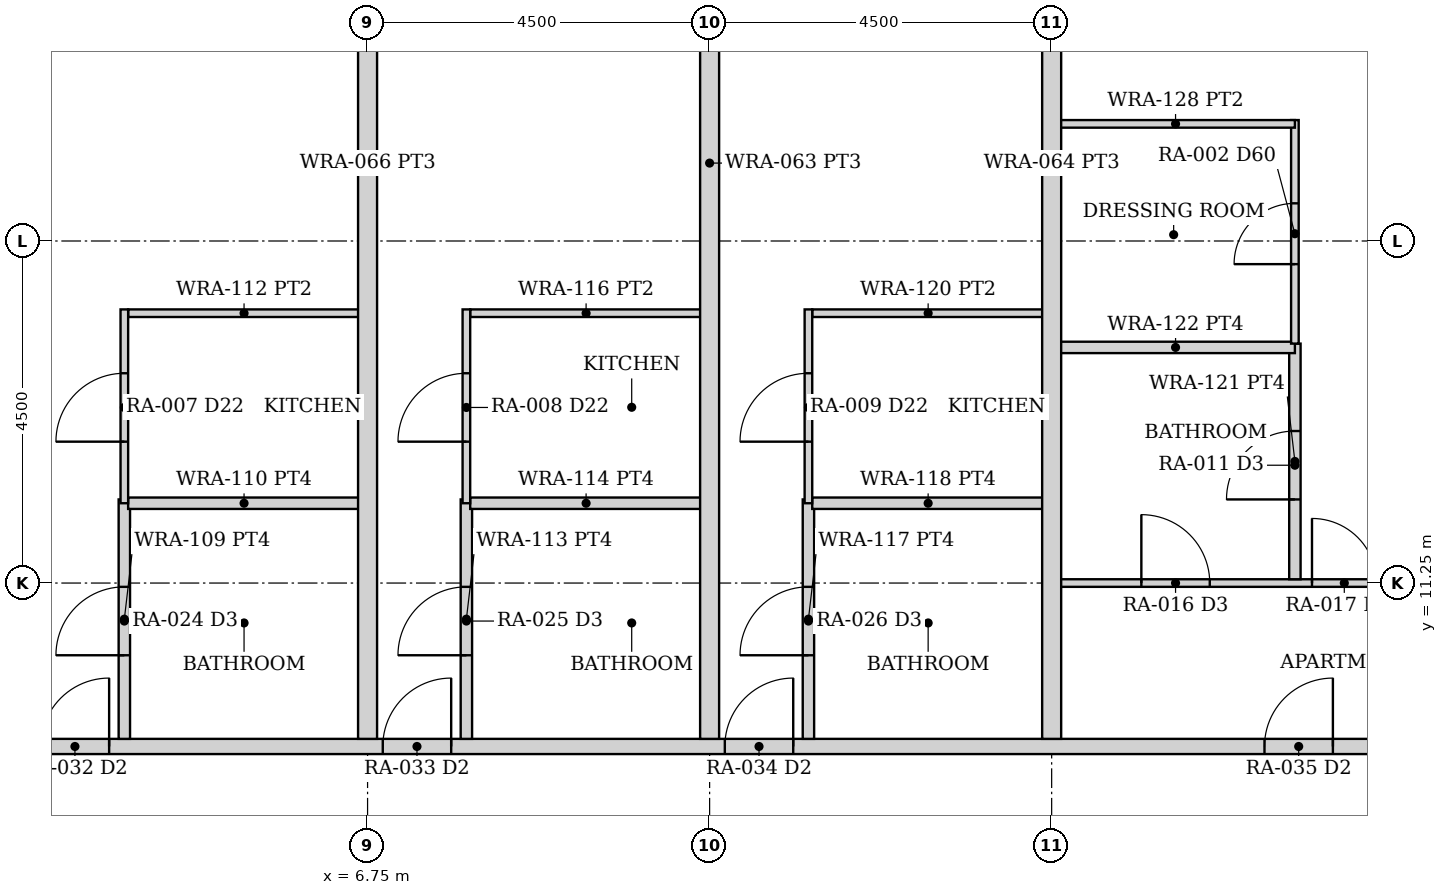
"""IFC4 building model, lengths in metres.
Left out: names, types, materials, properties, quantities, classifications, styles, units other than length and angle.
Written with IfcOpenShell. Run it as: python <this file> out.ifc"""

import sys

from ifc_helpers import new_model, si_unit, direction, frame, frame_2d, origin, place, context, subcontext, project, spatial, rectangle, extrude, element, fill, save


model = new_model("IFC4")
c1 = context("Model", 3, precision=1e-05, world=origin(), true_north=direction((0.0, 1.0)))
c2 = subcontext(c1, "Body", "Model", "MODEL_VIEW")
j1 = project(units=[si_unit("LENGTHUNIT", "METRE"), si_unit("PLANEANGLEUNIT", "RADIAN")], contexts=[c1])
p1 = place(None, origin())
s1 = spatial("IfcSite", under=j1, at=p1, CompositionType="ELEMENT")
p2 = place(p1, origin())
s2 = spatial("IfcBuilding", under=s1, at=p2, CompositionType="ELEMENT")
p3 = place(p2, frame((0.0, 0.0, 30.0)))
s3 = spatial("IfcBuildingStorey", under=s2, at=p3, CompositionType="ELEMENT", Elevation=30.0)
p4 = place(p3, frame((-24.55, 9.1, 0.0), z_axis=(0.0, 0.0, 1.0), x_axis=(1.0, 0.0, 0.0)))
e1 = element("IfcWall", 1, at=p4, inside=s3, PredefinedType="PARTITIONING", context=c2, shape_type="SweptSolid", body=[
    extrude(rectangle(XDim=49.1, YDim=0.2, at=frame_2d((24.55, 0.0))), origin(), (0.0, 0.0, 1.0), 2.373),
])
p5 = place(p4, frame((5.1, 0.0, 0.0)))
e2 = element("IfcOpeningElement", 2, at=p5, cuts=e1, PredefinedType="OPENING", context=c2, shape_type="SweptSolid", body=[
    extrude(rectangle(XDim=0.9, YDim=2.1, at=frame_2d((0.45, 1.05))), frame((0.0, 0.11, 0.0), z_axis=(0.0, -1.0, 0.0), x_axis=(1.0, 0.0, 0.0)), (0.0, 0.0, 1.0), 0.22),
])
p6 = place(p4, frame((9.0, 0.0, 0.0)))
e3 = element("IfcOpeningElement", 3, at=p6, cuts=e1, PredefinedType="OPENING", context=c2, shape_type="SweptSolid", body=[
    extrude(rectangle(XDim=0.9, YDim=2.1, at=frame_2d((0.45, 1.05))), frame((0.0, 0.11, 0.0), z_axis=(0.0, -1.0, 0.0), x_axis=(1.0, 0.0, 0.0)), (0.0, 0.0, 1.0), 0.22),
])
p7 = place(p4, frame((13.5, 0.0, 0.0)))
e4 = element("IfcOpeningElement", 4, at=p7, cuts=e1, PredefinedType="OPENING", context=c2, shape_type="SweptSolid", body=[
    extrude(rectangle(XDim=0.9, YDim=2.1, at=frame_2d((0.45, 1.05))), frame((0.0, 0.11, 0.0), z_axis=(0.0, -1.0, 0.0), x_axis=(1.0, 0.0, 0.0)), (0.0, 0.0, 1.0), 0.22),
])
p8 = place(p4, frame((18.0, 0.0, 0.0)))
e5 = element("IfcOpeningElement", 5, at=p8, cuts=e1, PredefinedType="OPENING", context=c2, shape_type="SweptSolid", body=[
    extrude(rectangle(XDim=0.9, YDim=2.1, at=frame_2d((0.45, 1.05))), frame((0.0, 0.11, 0.0), z_axis=(0.0, -1.0, 0.0), x_axis=(1.0, 0.0, 0.0)), (0.0, 0.0, 1.0), 0.22),
])
p9 = place(p4, frame((22.5, 0.0, 0.0)))
e6 = element("IfcOpeningElement", 6, at=p9, cuts=e1, PredefinedType="OPENING", context=c2, shape_type="SweptSolid", body=[
    extrude(rectangle(XDim=0.9, YDim=2.1, at=frame_2d((0.45, 1.05))), frame((0.0, 0.11, 0.0), z_axis=(0.0, -1.0, 0.0), x_axis=(1.0, 0.0, 0.0)), (0.0, 0.0, 1.0), 0.22),
])
p10 = place(p4, frame((27.0, 0.0, 0.0)))
e7 = element("IfcOpeningElement", 7, at=p10, cuts=e1, PredefinedType="OPENING", context=c2, shape_type="SweptSolid", body=[
    extrude(rectangle(XDim=0.9, YDim=2.1, at=frame_2d((0.45, 1.05))), frame((0.0, 0.11, 0.0), z_axis=(0.0, -1.0, 0.0), x_axis=(1.0, 0.0, 0.0)), (0.0, 0.0, 1.0), 0.22),
])
p11 = place(p4, frame((31.5, 0.0, 0.0)))
e8 = element("IfcOpeningElement", 8, at=p11, cuts=e1, PredefinedType="OPENING", context=c2, shape_type="SweptSolid", body=[
    extrude(rectangle(XDim=0.9, YDim=2.1, at=frame_2d((0.45, 1.05))), frame((0.0, 0.11, 0.0), z_axis=(0.0, -1.0, 0.0), x_axis=(1.0, 0.0, 0.0)), (0.0, 0.0, 1.0), 0.22),
])
p12 = place(p4, frame((36.0, 0.0, 0.0)))
e9 = element("IfcOpeningElement", 9, at=p12, cuts=e1, PredefinedType="OPENING", context=c2, shape_type="SweptSolid", body=[
    extrude(rectangle(XDim=0.9, YDim=2.1, at=frame_2d((0.45, 1.05))), frame((0.0, 0.11, 0.0), z_axis=(0.0, -1.0, 0.0), x_axis=(1.0, 0.0, 0.0)), (0.0, 0.0, 1.0), 0.22),
])
p13 = place(p4, frame((43.1, 0.0, 0.0)))
e10 = element("IfcOpeningElement", 10, at=p13, cuts=e1, PredefinedType="OPENING", context=c2, shape_type="SweptSolid", body=[
    extrude(rectangle(XDim=0.9, YDim=2.1, at=frame_2d((0.45, 1.05))), frame((0.0, 0.11, 0.0), z_axis=(0.0, -1.0, 0.0), x_axis=(1.0, 0.0, 0.0)), (0.0, 0.0, 1.0), 0.22),
])
p14 = place(p3, frame((3.55, 9.2, 0.0), z_axis=(0.0, 0.0, 1.0), x_axis=(0.0, 1.0, 0.0)))
e11 = element("IfcWall", 11, at=p14, inside=s3, PredefinedType="PARTITIONING", context=c2, shape_type="SweptSolid", body=[
    extrude(rectangle(XDim=3.15, YDim=0.15, at=frame_2d((1.575, 0.0))), origin(), (0.0, 0.0, 1.0), 2.373),
])
p15 = place(p14, frame((1.1, 0.0, 0.0)))
e12 = element("IfcOpeningElement", 12, at=p15, cuts=e11, PredefinedType="OPENING", context=c2, shape_type="SweptSolid", body=[
    extrude(rectangle(XDim=0.9, YDim=2.1, at=frame_2d((0.45, 1.05))), frame((0.0, 0.085, 0.0), z_axis=(0.0, -1.0, 0.0), x_axis=(1.0, 0.0, 0.0)), (0.0, 0.0, 1.0), 0.17),
])
p16 = place(p3, frame((3.6, 12.3, 0.0), z_axis=(0.0, 0.0, 1.0), x_axis=(1.0, 0.0, 0.0)))
e13 = element("IfcWall", 13, at=p16, inside=s3, PredefinedType="PARTITIONING", context=c2, shape_type="SweptSolid", body=[
    extrude(rectangle(XDim=3.05, YDim=0.15, at=frame_2d((1.525, 0.0))), origin(), (0.0, 0.0, 1.0), 2.373),
])
p17 = place(p3, frame((3.6, 14.8, 0.0), z_axis=(0.0, 0.0, 1.0), x_axis=(1.0, 0.0, 0.0)))
e14 = element("IfcWall", 14, at=p17, inside=s3, PredefinedType="PARTITIONING", context=c2, shape_type="SweptSolid", body=[
    extrude(rectangle(XDim=3.05, YDim=0.1, at=frame_2d((1.525, 0.0))), origin(), (0.0, 0.0, 1.0), 2.373),
])
p18 = place(p3, frame((3.55, 12.3, 0.0), z_axis=(0.0, 0.0, 1.0), x_axis=(0.0, 1.0, 0.0)))
e15 = element("IfcWall", 15, at=p18, inside=s3, PredefinedType="PARTITIONING", context=c2, shape_type="SweptSolid", body=[
    extrude(rectangle(XDim=2.55, YDim=0.1, at=frame_2d((1.275, 0.0))), origin(), (0.0, 0.0, 1.0), 2.373),
])
p19 = place(p18, frame((0.81, 0.0, 0.0)))
e16 = element("IfcOpeningElement", 16, at=p19, cuts=e15, PredefinedType="OPENING", context=c2, shape_type="SweptSolid", body=[
    extrude(rectangle(XDim=0.9, YDim=2.1, at=frame_2d((0.45, 1.05))), frame((0.0, 0.06, 0.0), z_axis=(0.0, -1.0, 0.0), x_axis=(1.0, 0.0, 0.0)), (0.0, 0.0, 1.0), 0.12),
])
p20 = place(p3, frame((8.05, 9.2, 0.0), z_axis=(0.0, 0.0, 1.0), x_axis=(0.0, 1.0, 0.0)))
e17 = element("IfcWall", 17, at=p20, inside=s3, PredefinedType="PARTITIONING", context=c2, shape_type="SweptSolid", body=[
    extrude(rectangle(XDim=3.15, YDim=0.15, at=frame_2d((1.575, 0.0))), origin(), (0.0, 0.0, 1.0), 2.373),
])
p21 = place(p20, frame((1.1, 0.0, 0.0)))
e18 = element("IfcOpeningElement", 18, at=p21, cuts=e17, PredefinedType="OPENING", context=c2, shape_type="SweptSolid", body=[
    extrude(rectangle(XDim=0.9, YDim=2.1, at=frame_2d((0.45, 1.05))), frame((0.0, 0.085, 0.0), z_axis=(0.0, -1.0, 0.0), x_axis=(1.0, 0.0, 0.0)), (0.0, 0.0, 1.0), 0.17),
])
p22 = place(p3, frame((8.1, 12.3, 0.0), z_axis=(0.0, 0.0, 1.0), x_axis=(1.0, 0.0, 0.0)))
e19 = element("IfcWall", 19, at=p22, inside=s3, PredefinedType="PARTITIONING", context=c2, shape_type="SweptSolid", body=[
    extrude(rectangle(XDim=3.05, YDim=0.15, at=frame_2d((1.525, 0.0))), origin(), (0.0, 0.0, 1.0), 2.373),
])
p23 = place(p3, frame((8.1, 14.8, 0.0), z_axis=(0.0, 0.0, 1.0), x_axis=(1.0, 0.0, 0.0)))
e20 = element("IfcWall", 20, at=p23, inside=s3, PredefinedType="PARTITIONING", context=c2, shape_type="SweptSolid", body=[
    extrude(rectangle(XDim=3.05, YDim=0.1, at=frame_2d((1.525, 0.0))), origin(), (0.0, 0.0, 1.0), 2.373),
])
p24 = place(p3, frame((8.05, 12.3, 0.0), z_axis=(0.0, 0.0, 1.0), x_axis=(0.0, 1.0, 0.0)))
e21 = element("IfcWall", 21, at=p24, inside=s3, PredefinedType="PARTITIONING", context=c2, shape_type="SweptSolid", body=[
    extrude(rectangle(XDim=2.55, YDim=0.1, at=frame_2d((1.275, 0.0))), origin(), (0.0, 0.0, 1.0), 2.373),
])
p25 = place(p24, frame((0.81, 0.0, 0.0)))
e22 = element("IfcOpeningElement", 22, at=p25, cuts=e21, PredefinedType="OPENING", context=c2, shape_type="SweptSolid", body=[
    extrude(rectangle(XDim=0.9, YDim=2.1, at=frame_2d((0.45, 1.05))), frame((0.0, 0.06, 0.0), z_axis=(0.0, -1.0, 0.0), x_axis=(1.0, 0.0, 0.0)), (0.0, 0.0, 1.0), 0.12),
])
p26 = place(p3, frame((12.55, 9.2, 0.0), z_axis=(0.0, 0.0, 1.0), x_axis=(0.0, 1.0, 0.0)))
e23 = element("IfcWall", 23, at=p26, inside=s3, PredefinedType="PARTITIONING", context=c2, shape_type="SweptSolid", body=[
    extrude(rectangle(XDim=3.15, YDim=0.15, at=frame_2d((1.575, 0.0))), origin(), (0.0, 0.0, 1.0), 2.373),
])
p27 = place(p26, frame((1.1, 0.0, 0.0)))
e24 = element("IfcOpeningElement", 24, at=p27, cuts=e23, PredefinedType="OPENING", context=c2, shape_type="SweptSolid", body=[
    extrude(rectangle(XDim=0.9, YDim=2.1, at=frame_2d((0.45, 1.05))), frame((0.0, 0.085, 0.0), z_axis=(0.0, -1.0, 0.0), x_axis=(1.0, 0.0, 0.0)), (0.0, 0.0, 1.0), 0.17),
])
p28 = place(p3, frame((12.6, 12.3, 0.0), z_axis=(0.0, 0.0, 1.0), x_axis=(1.0, 0.0, 0.0)))
e25 = element("IfcWall", 25, at=p28, inside=s3, PredefinedType="PARTITIONING", context=c2, shape_type="SweptSolid", body=[
    extrude(rectangle(XDim=3.05, YDim=0.15, at=frame_2d((1.525, 0.0))), origin(), (0.0, 0.0, 1.0), 2.373),
])
p29 = place(p3, frame((12.6, 14.8, 0.0), z_axis=(0.0, 0.0, 1.0), x_axis=(1.0, 0.0, 0.0)))
e26 = element("IfcWall", 26, at=p29, inside=s3, PredefinedType="PARTITIONING", context=c2, shape_type="SweptSolid", body=[
    extrude(rectangle(XDim=3.05, YDim=0.1, at=frame_2d((1.525, 0.0))), origin(), (0.0, 0.0, 1.0), 2.373),
])
p30 = place(p3, frame((12.55, 12.3, 0.0), z_axis=(0.0, 0.0, 1.0), x_axis=(0.0, 1.0, 0.0)))
e27 = element("IfcWall", 27, at=p30, inside=s3, PredefinedType="PARTITIONING", context=c2, shape_type="SweptSolid", body=[
    extrude(rectangle(XDim=2.55, YDim=0.1, at=frame_2d((1.275, 0.0))), origin(), (0.0, 0.0, 1.0), 2.373),
])
p31 = place(p30, frame((0.81, 0.0, 0.0)))
e28 = element("IfcOpeningElement", 28, at=p31, cuts=e27, PredefinedType="OPENING", context=c2, shape_type="SweptSolid", body=[
    extrude(rectangle(XDim=0.9, YDim=2.1, at=frame_2d((0.45, 1.05))), frame((0.0, 0.06, 0.0), z_axis=(0.0, -1.0, 0.0), x_axis=(1.0, 0.0, 0.0)), (0.0, 0.0, 1.0), 0.12),
])
p32 = place(p3, frame((15.85, 11.25, 0.0), z_axis=(0.0, 0.0, 1.0), x_axis=(1.0, 0.0, 0.0)))
e29 = element("IfcWall", 29, at=p32, inside=s3, PredefinedType="PARTITIONING", context=c2, shape_type="SweptSolid", body=[
    extrude(rectangle(XDim=8.5, YDim=0.1, at=frame_2d((4.25, 0.0))), origin(), (0.0, 0.0, 1.0), 2.373),
])
p33 = place(p32, frame((5.225, 0.0, 0.0)))
e30 = element("IfcOpeningElement", 30, at=p33, cuts=e29, PredefinedType="OPENING", context=c2, shape_type="SweptSolid", body=[
    extrude(rectangle(XDim=0.9, YDim=2.1, at=frame_2d((0.45, 1.05))), frame((0.0, 0.06, 0.0), z_axis=(0.0, -1.0, 0.0), x_axis=(1.0, 0.0, 0.0)), (0.0, 0.0, 1.0), 0.12),
])
p34 = place(p32, frame((7.25, 0.0, 0.0)))
e31 = element("IfcOpeningElement", 31, at=p34, cuts=e29, PredefinedType="OPENING", context=c2, shape_type="SweptSolid", body=[
    extrude(rectangle(XDim=0.9, YDim=2.1, at=frame_2d((0.45, 1.05))), frame((0.0, 0.06, 0.0), z_axis=(0.0, -1.0, 0.0), x_axis=(1.0, 0.0, 0.0)), (0.0, 0.0, 1.0), 0.12),
])
p35 = place(p32, frame((3.325, 0.0, 0.0)))
e32 = element("IfcOpeningElement", 32, at=p35, cuts=e29, PredefinedType="OPENING", context=c2, shape_type="SweptSolid", body=[
    extrude(rectangle(XDim=0.85, YDim=2.1, at=frame_2d((0.425, 1.05))), frame((0.0, 0.06, 0.0), z_axis=(0.0, -1.0, 0.0), x_axis=(1.0, 0.0, 0.0)), (0.0, 0.0, 1.0), 0.12),
])
p36 = place(p32, frame((1.08, 0.0, 0.0)))
e33 = element("IfcOpeningElement", 33, at=p36, cuts=e29, PredefinedType="OPENING", context=c2, shape_type="SweptSolid", body=[
    extrude(rectangle(XDim=0.9, YDim=2.1, at=frame_2d((0.45, 1.05))), frame((0.0, 0.06, 0.0), z_axis=(0.0, -1.0, 0.0), x_axis=(1.0, 0.0, 0.0)), (0.0, 0.0, 1.0), 0.12),
])
p37 = place(p3, frame((18.95, 11.3, 0.0), z_axis=(0.0, 0.0, 1.0), x_axis=(0.0, 1.0, 0.0)))
e34 = element("IfcWall", 34, at=p37, inside=s3, PredefinedType="PARTITIONING", context=c2, shape_type="SweptSolid", body=[
    extrude(rectangle(XDim=3.1, YDim=0.15, at=frame_2d((1.55, 0.0))), origin(), (0.0, 0.0, 1.0), 2.373),
])
p38 = place(p37, frame((1.05, 0.0, 0.0)))
e35 = element("IfcOpeningElement", 35, at=p38, cuts=e34, PredefinedType="OPENING", context=c2, shape_type="SweptSolid", body=[
    extrude(rectangle(XDim=0.9, YDim=2.1, at=frame_2d((0.45, 1.05))), frame((0.0, 0.085, 0.0), z_axis=(0.0, -1.0, 0.0), x_axis=(1.0, 0.0, 0.0)), (0.0, 0.0, 1.0), 0.17),
])
p39 = place(p3, frame((15.81, 14.35, 0.0), z_axis=(0.0, 0.0, 1.0), x_axis=(1.0, 0.0, 0.0)))
e36 = element("IfcWall", 36, at=p39, inside=s3, PredefinedType="PARTITIONING", context=c2, shape_type="SweptSolid", body=[
    extrude(rectangle(XDim=3.14, YDim=0.15, at=frame_2d((1.57, 0.0))), origin(), (0.0, 0.0, 1.0), 2.373),
])
p40 = place(p3, frame((18.95, 14.4, 0.0), z_axis=(0.0, 0.0, 1.0), x_axis=(0.0, 1.0, 0.0)))
e37 = element("IfcWall", 37, at=p40, inside=s3, PredefinedType="PARTITIONING", context=c2, shape_type="SweptSolid", body=[
    extrude(rectangle(XDim=2.941, YDim=0.1, at=frame_2d((1.47, 0.0))), origin(), (0.0, 0.0, 1.0), 2.373),
])
p41 = place(p40, frame((1.045, 0.0, 0.0)))
e38 = element("IfcOpeningElement", 38, at=p41, cuts=e37, PredefinedType="OPENING", context=c2, shape_type="SweptSolid", body=[
    extrude(rectangle(XDim=0.8, YDim=2.1, at=frame_2d((0.4, 1.05))), frame((0.0, 0.06, 0.0), z_axis=(0.0, -1.0, 0.0), x_axis=(1.0, 0.0, 0.0)), (0.0, 0.0, 1.0), 0.12),
])
p42 = place(p3, frame((15.81, 17.291, 0.0), z_axis=(0.0, 0.0, 1.0), x_axis=(1.0, 0.0, 0.0)))
e39 = element("IfcWall", 39, at=p42, inside=s3, PredefinedType="PARTITIONING", context=c2, shape_type="SweptSolid", body=[
    extrude(rectangle(XDim=3.14, YDim=0.1, at=frame_2d((1.57, 0.0))), origin(), (0.0, 0.0, 1.0), 2.373),
])
for number, where, z_axis, x_axis in (
    (40, (6.75, 9.2, 0.0), (0.0, 0.0, 1.0), (0.0, 1.0, 0.0)),
    (41, (11.25, 9.2, 0.0), (0.0, 0.0, 1.0), (0.0, 1.0, 0.0)),
    (42, (15.75, 9.2, 0.0), (0.0, 0.0, 1.0), (0.0, 1.0, 0.0)),
):
    element("IfcWall", number, at=place(p3, frame(where, z_axis=z_axis, x_axis=x_axis)), inside=s3, PredefinedType="PARTITIONING", context=c2, shape_type="SweptSolid", body=[
        extrude(rectangle(XDim=15.15, YDim=0.25, at=frame_2d((7.575, 0.0))), origin(), (0.0, 0.0, 1.0), 2.373),
    ])
p43 = place(p10, origin())
e43 = element("IfcDoor", 43, at=p43, inside=s3, OperationType="SINGLE_SWING_RIGHT", PredefinedType="DOOR", context=c2, shape_type="SweptSolid", body=[
    extrude(rectangle(XDim=0.9, YDim=2.1, at=frame_2d((0.45, 1.05))), frame((0.0, 0.025, 0.0), z_axis=(0.0, -1.0, 0.0), x_axis=(1.0, 0.0, 0.0)), (0.0, 0.0, 1.0), 0.05),
])
fill(e7, e43)
p44 = place(p15, origin())
e44 = element("IfcDoor", 44, at=p44, inside=s3, OperationType="SINGLE_SWING_LEFT", PredefinedType="DOOR", context=c2, shape_type="SweptSolid", body=[
    extrude(rectangle(XDim=0.9, YDim=2.1, at=frame_2d((0.45, 1.05))), frame((0.0, 0.025, 0.0), z_axis=(0.0, -1.0, 0.0), x_axis=(1.0, 0.0, 0.0)), (0.0, 0.0, 1.0), 0.05),
])
fill(e12, e44)
p45 = place(p19, origin())
e45 = element("IfcDoor", 45, at=p45, inside=s3, OperationType="SINGLE_SWING_LEFT", PredefinedType="DOOR", context=c2, shape_type="SweptSolid", body=[
    extrude(rectangle(XDim=0.9, YDim=2.1, at=frame_2d((0.45, 1.05))), frame((0.0, 0.025, 0.0), z_axis=(0.0, -1.0, 0.0), x_axis=(1.0, 0.0, 0.0)), (0.0, 0.0, 1.0), 0.05),
])
fill(e16, e45)
p46 = place(p11, origin())
e46 = element("IfcDoor", 46, at=p46, inside=s3, OperationType="SINGLE_SWING_RIGHT", PredefinedType="DOOR", context=c2, shape_type="SweptSolid", body=[
    extrude(rectangle(XDim=0.9, YDim=2.1, at=frame_2d((0.45, 1.05))), frame((0.0, 0.025, 0.0), z_axis=(0.0, -1.0, 0.0), x_axis=(1.0, 0.0, 0.0)), (0.0, 0.0, 1.0), 0.05),
])
fill(e8, e46)
p47 = place(p21, origin())
e47 = element("IfcDoor", 47, at=p47, inside=s3, OperationType="SINGLE_SWING_LEFT", PredefinedType="DOOR", context=c2, shape_type="SweptSolid", body=[
    extrude(rectangle(XDim=0.9, YDim=2.1, at=frame_2d((0.45, 1.05))), frame((0.0, 0.025, 0.0), z_axis=(0.0, -1.0, 0.0), x_axis=(1.0, 0.0, 0.0)), (0.0, 0.0, 1.0), 0.05),
])
fill(e18, e47)
p48 = place(p25, origin())
e48 = element("IfcDoor", 48, at=p48, inside=s3, OperationType="SINGLE_SWING_LEFT", PredefinedType="DOOR", context=c2, shape_type="SweptSolid", body=[
    extrude(rectangle(XDim=0.9, YDim=2.1, at=frame_2d((0.45, 1.05))), frame((0.0, 0.025, 0.0), z_axis=(0.0, -1.0, 0.0), x_axis=(1.0, 0.0, 0.0)), (0.0, 0.0, 1.0), 0.05),
])
fill(e22, e48)
p49 = place(p12, origin())
e49 = element("IfcDoor", 49, at=p49, inside=s3, OperationType="SINGLE_SWING_RIGHT", PredefinedType="DOOR", context=c2, shape_type="SweptSolid", body=[
    extrude(rectangle(XDim=0.9, YDim=2.1, at=frame_2d((0.45, 1.05))), frame((0.0, 0.025, 0.0), z_axis=(0.0, -1.0, 0.0), x_axis=(1.0, 0.0, 0.0)), (0.0, 0.0, 1.0), 0.05),
])
fill(e9, e49)
p50 = place(p27, origin())
e50 = element("IfcDoor", 50, at=p50, inside=s3, OperationType="SINGLE_SWING_LEFT", PredefinedType="DOOR", context=c2, shape_type="SweptSolid", body=[
    extrude(rectangle(XDim=0.9, YDim=2.1, at=frame_2d((0.45, 1.05))), frame((0.0, 0.025, 0.0), z_axis=(0.0, -1.0, 0.0), x_axis=(1.0, 0.0, 0.0)), (0.0, 0.0, 1.0), 0.05),
])
fill(e24, e50)
p51 = place(p31, origin())
e51 = element("IfcDoor", 51, at=p51, inside=s3, OperationType="SINGLE_SWING_LEFT", PredefinedType="DOOR", context=c2, shape_type="SweptSolid", body=[
    extrude(rectangle(XDim=0.9, YDim=2.1, at=frame_2d((0.45, 1.05))), frame((0.0, 0.025, 0.0), z_axis=(0.0, -1.0, 0.0), x_axis=(1.0, 0.0, 0.0)), (0.0, 0.0, 1.0), 0.05),
])
fill(e28, e51)
p52 = place(p13, origin())
e52 = element("IfcDoor", 52, at=p52, inside=s3, OperationType="SINGLE_SWING_RIGHT", PredefinedType="DOOR", context=c2, shape_type="SweptSolid", body=[
    extrude(rectangle(XDim=0.9, YDim=2.1, at=frame_2d((0.45, 1.05))), frame((0.0, 0.025, 0.0), z_axis=(0.0, -1.0, 0.0), x_axis=(1.0, 0.0, 0.0)), (0.0, 0.0, 1.0), 0.05),
])
fill(e10, e52)
p53 = place(p35, origin())
e53 = element("IfcDoor", 53, at=p53, inside=s3, OperationType="SINGLE_SWING_LEFT", PredefinedType="DOOR", context=c2, shape_type="SweptSolid", body=[
    extrude(rectangle(XDim=0.85, YDim=2.1, at=frame_2d((0.425, 1.05))), frame((0.0, 0.025, 0.0), z_axis=(0.0, -1.0, 0.0), x_axis=(1.0, 0.0, 0.0)), (0.0, 0.0, 1.0), 0.05),
])
fill(e32, e53)
p54 = place(p38, origin())
e54 = element("IfcDoor", 54, at=p54, inside=s3, OperationType="SINGLE_SWING_LEFT", PredefinedType="DOOR", context=c2, shape_type="SweptSolid", body=[
    extrude(rectangle(XDim=0.9, YDim=2.1, at=frame_2d((0.45, 1.05))), frame((0.0, 0.025, 0.0), z_axis=(0.0, -1.0, 0.0), x_axis=(1.0, 0.0, 0.0)), (0.0, 0.0, 1.0), 0.05),
])
fill(e35, e54)
p55 = place(p36, origin())
e55 = element("IfcDoor", 55, at=p55, inside=s3, OperationType="SINGLE_SWING_LEFT", PredefinedType="DOOR", context=c2, shape_type="SweptSolid", body=[
    extrude(rectangle(XDim=0.9, YDim=2.1, at=frame_2d((0.45, 1.05))), frame((0.0, 0.025, 0.0), z_axis=(0.0, -1.0, 0.0), x_axis=(1.0, 0.0, 0.0)), (0.0, 0.0, 1.0), 0.05),
])
fill(e33, e55)
p56 = place(p41, origin())
e56 = element("IfcDoor", 56, at=p56, inside=s3, OperationType="SINGLE_SWING_LEFT", PredefinedType="DOOR", context=c2, shape_type="SweptSolid", body=[
    extrude(rectangle(XDim=0.8, YDim=2.1, at=frame_2d((0.4, 1.05))), frame((0.0, 0.025, 0.0), z_axis=(0.0, -1.0, 0.0), x_axis=(1.0, 0.0, 0.0)), (0.0, 0.0, 1.0), 0.05),
])
fill(e38, e56)
save(model, sys.argv[1])
